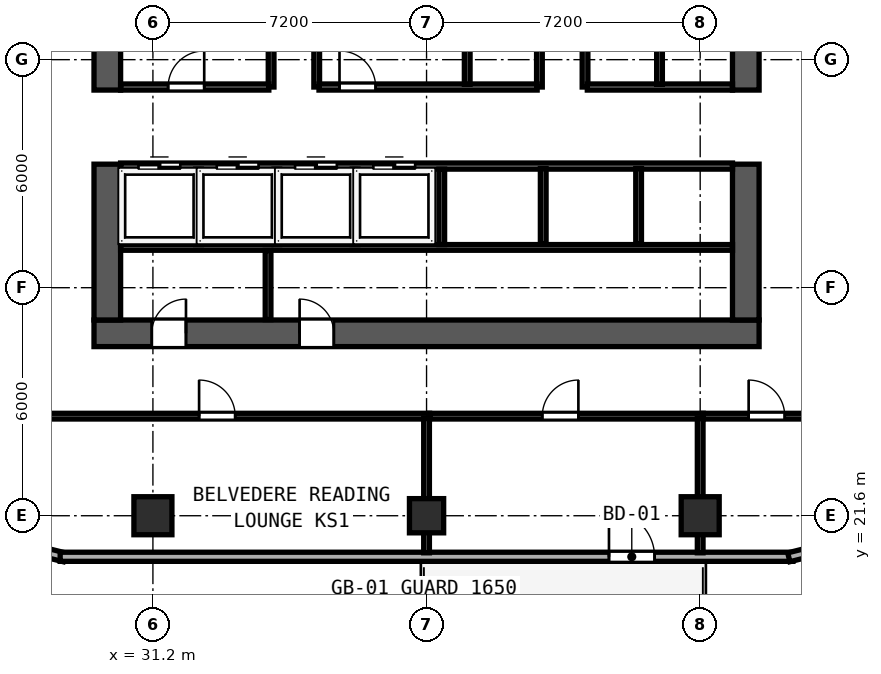
"""IFC4 building model, lengths in metres.
Left out: names, types, materials, properties, quantities, classifications, styles, units other than length and angle.
Written with IfcOpenShell. Run it as: python <this file> out.ifc"""

import sys

from ifc_helpers import new_model, si_unit, direction, frame, frame_2d, origin, origin_2d, place, context, subcontext, project, spatial, rectangle, hollow_rectangle, extrude, element, fill, save


model = new_model("IFC4")
c1 = context("Model", 3, precision=1e-05, world=origin(), true_north=direction((0.0, 1.0)))
c2 = subcontext(c1, "Body", "Model", "MODEL_VIEW")
j1 = project(units=[si_unit("LENGTHUNIT", "METRE"), si_unit("PLANEANGLEUNIT", "RADIAN")], contexts=[c1])
p1 = place(None, origin())
s1 = spatial("IfcSite", under=j1, at=p1, CompositionType="ELEMENT")
p2 = place(p1, origin())
s2 = spatial("IfcBuilding", under=s1, at=p2, CompositionType="ELEMENT")
p3 = place(p2, frame((0.0, 0.0, 128.8)))
s3 = spatial("IfcBuildingStorey", under=s2, at=p3, CompositionType="ELEMENT", Elevation=128.8)
p4 = place(p3, frame((29.65, 26.4, 0.0), z_axis=(0.0, 0.0, 1.0), x_axis=(1.0, 0.0, 0.0)))
e1 = element("IfcWall", 1, at=p4, inside=s3, PredefinedType="SHEAR", context=c2, shape_type="SweptSolid", body=[
    extrude(rectangle(XDim=17.5, YDim=0.7, at=frame_2d((8.75, 0.0))), origin(), (0.0, 0.0, 1.0), 3.6),
])
p5 = place(p4, frame((2.42, 0.0, 0.0), z_axis=(0.0, 0.0, 1.0), x_axis=(-1.0, 0.0, 0.0)))
e2 = element("IfcOpeningElement", 2, at=p5, cuts=e1, PredefinedType="OPENING", context=c2, shape_type="SweptSolid", body=[
    extrude(rectangle(XDim=0.9, YDim=2.1, at=frame_2d((0.45, 1.05))), frame((0.0, 0.36, 0.0), z_axis=(0.0, -1.0, 0.0), x_axis=(1.0, 0.0, 0.0)), (0.0, 0.0, 1.0), 0.72),
])
p6 = place(p4, frame((6.31, 0.0, 0.0), z_axis=(0.0, 0.0, 1.0), x_axis=(-1.0, 0.0, 0.0)))
e3 = element("IfcOpeningElement", 3, at=p6, cuts=e1, PredefinedType="OPENING", context=c2, shape_type="SweptSolid", body=[
    extrude(rectangle(XDim=0.9, YDim=2.1, at=frame_2d((0.45, 1.05))), frame((0.0, 0.36, 0.0), z_axis=(0.0, -1.0, 0.0), x_axis=(1.0, 0.0, 0.0)), (0.0, 0.0, 1.0), 0.72),
])
p7 = place(p3, frame((30.0, 26.75, 0.0), z_axis=(0.0, 0.0, 1.0), x_axis=(0.0, 1.0, 0.0)))
e4 = element("IfcWall", 4, at=p7, inside=s3, PredefinedType="SHEAR", context=c2, shape_type="SweptSolid", body=[
    extrude(rectangle(XDim=4.1, YDim=0.7, at=frame_2d((2.05, 0.0))), origin(), (0.0, 0.0, 1.0), 3.6),
])
p8 = place(p3, frame((30.0, 32.8, 0.0), z_axis=(0.0, 0.0, 1.0), x_axis=(0.0, 1.0, 0.0)))
e5 = element("IfcWall", 5, at=p8, inside=s3, PredefinedType="SHEAR", context=c2, shape_type="SweptSolid", body=[
    extrude(rectangle(XDim=10.05, YDim=0.7, at=frame_2d((5.025, 0.0))), origin(), (0.0, 0.0, 1.0), 3.6),
])
p9 = place(p3, frame((46.8, 26.75, 0.0), z_axis=(0.0, 0.0, 1.0), x_axis=(0.0, 1.0, 0.0)))
e6 = element("IfcWall", 6, at=p9, inside=s3, PredefinedType="SHEAR", context=c2, shape_type="SweptSolid", body=[
    extrude(rectangle(XDim=4.1, YDim=0.7, at=frame_2d((2.05, 0.0))), origin(), (0.0, 0.0, 1.0), 3.6),
])
p10 = place(p3, frame((46.8, 32.8, 0.0), z_axis=(0.0, 0.0, 1.0), x_axis=(0.0, 1.0, 0.0)))
e7 = element("IfcWall", 7, at=p10, inside=s3, PredefinedType="SHEAR", context=c2, shape_type="SweptSolid", body=[
    extrude(rectangle(XDim=10.05, YDim=0.7, at=frame_2d((5.025, 0.0))), origin(), (0.0, 0.0, 1.0), 3.6),
])
for number, where, z_axis, x_axis in (
    (8, (31.2, 21.6, 0.0), (0.0, 0.0, 1.0), (1.0, 0.0, 0.0)),
    (9, (45.6, 21.6, 0.0), (0.0, 0.0, 1.0), (1.0, 0.0, 0.0)),
):
    element("IfcColumn", number, at=place(p3, frame(where, z_axis=z_axis, x_axis=x_axis)), inside=s3, PredefinedType="COLUMN", context=c2, shape_type="SweptSolid", body=[
        extrude(hollow_rectangle(XDim=1.0, YDim=1.0, WallThickness=0.038, at=origin_2d()), origin(), (0.0, 0.0, 1.0), 3.8),
    ])
p11 = place(p3, frame((38.4, 21.6, 0.0), z_axis=(0.0, 0.0, 1.0), x_axis=(1.0, 0.0, 0.0)))
e10 = element("IfcColumn", 10, at=p11, inside=s3, PredefinedType="COLUMN", context=c2, shape_type="SweptSolid", body=[
    extrude(hollow_rectangle(XDim=0.9, YDim=0.9, WallThickness=0.034, at=origin_2d()), origin(), (0.0, 0.0, 1.0), 3.8),
])
p12 = place(p3, frame((24.492, 21.601, 0.0), z_axis=(0.0, 0.0, 1.0), x_axis=(0.970145683738, -0.242522890311, 0.0)))
e11 = element("IfcWall", 11, at=p12, inside=s3, PredefinedType="SOLIDWALL", context=c2, shape_type="SweptSolid", body=[
    extrude(rectangle(XDim=4.511, YDim=0.24, at=frame_2d((2.255, 0.0))), origin(), (0.0, 0.0, 1.0), 3.145),
])
p13 = place(p12, frame((0.7, 0.0, 0.85)))
e12 = element("IfcOpeningElement", 12, at=p13, cuts=e11, PredefinedType="OPENING", context=c2, shape_type="SweptSolid", body=[
    extrude(rectangle(XDim=1.15, YDim=1.8, at=frame_2d((0.575, 0.9))), frame((0.0, 0.13, 0.0), z_axis=(0.0, -1.0, 0.0), x_axis=(1.0, 0.0, 0.0)), (0.0, 0.0, 1.0), 0.26),
])
p14 = place(p3, frame((28.76, 20.52, 0.0), z_axis=(0.0, 0.0, 1.0), x_axis=(1.0, 0.0, 0.0)))
e13 = element("IfcWall", 13, at=p14, inside=s3, PredefinedType="SOLIDWALL", context=c2, shape_type="SweptSolid", body=[
    extrude(rectangle(XDim=19.281, YDim=0.24, at=frame_2d((9.64, 0.0))), origin(), (0.0, 0.0, 1.0), 3.6),
])
p15 = place(p14, frame((15.64, 0.0, 0.0), z_axis=(0.0, 0.0, 1.0), x_axis=(-1.0, 0.0, 0.0)))
e14 = element("IfcOpeningElement", 14, at=p15, cuts=e13, PredefinedType="OPENING", context=c2, shape_type="SweptSolid", body=[
    extrude(rectangle(XDim=1.2, YDim=2.15, at=frame_2d((0.6, 1.075))), frame((0.0, 0.13, 0.0), z_axis=(0.0, -1.0, 0.0), x_axis=(1.0, 0.0, 0.0)), (0.0, 0.0, 1.0), 0.26),
])
p16 = place(p3, frame((47.932, 20.507, 0.0), z_axis=(0.0, 0.0, 1.0), x_axis=(0.970145683738, 0.242522890311, 0.0)))
e15 = element("IfcWall", 15, at=p16, inside=s3, PredefinedType="SOLIDWALL", context=c2, shape_type="SweptSolid", body=[
    extrude(rectangle(XDim=4.511, YDim=0.24, at=frame_2d((2.255, 0.0))), origin(), (0.0, 0.0, 1.0), 3.145),
])
p17 = place(p16, frame((0.7, 0.0, 0.85)))
e16 = element("IfcOpeningElement", 16, at=p17, cuts=e15, PredefinedType="OPENING", context=c2, shape_type="SweptSolid", body=[
    extrude(rectangle(XDim=1.15, YDim=1.8, at=frame_2d((0.575, 0.9))), frame((0.0, 0.13, 0.0), z_axis=(0.0, -1.0, 0.0), x_axis=(1.0, 0.0, 0.0)), (0.0, 0.0, 1.0), 0.26),
])
for number, where, z_axis, x_axis in (
    (17, (34.31, 32.88, 0.0), (0.0, 0.0, 1.0), (0.0, 1.0, 0.0)),
    (18, (35.51, 32.88, 0.0), (0.0, 0.0, 1.0), (0.0, 1.0, 0.0)),
    (19, (41.37, 32.88, 0.0), (0.0, 0.0, 1.0), (0.0, 1.0, 0.0)),
    (20, (42.57, 32.88, 0.0), (0.0, 0.0, 1.0), (0.0, 1.0, 0.0)),
):
    element("IfcWall", number, at=place(p3, frame(where, z_axis=z_axis, x_axis=x_axis)), inside=s3, PredefinedType="SOLIDWALL", context=c2, shape_type="SweptSolid", body=[
        extrude(rectangle(XDim=2.17, YDim=0.15, at=frame_2d((1.085, 0.0))), origin(), (0.0, 0.0, 1.0), 3.6),
    ])
p18 = place(p3, frame((30.35, 32.88, 0.0), z_axis=(0.0, 0.0, 1.0), x_axis=(1.0, 0.0, 0.0)))
e21 = element("IfcWall", 21, at=p18, inside=s3, PredefinedType="SOLIDWALL", context=c2, shape_type="SweptSolid", body=[
    extrude(rectangle(XDim=3.9, YDim=0.16, at=frame_2d((1.95, 0.0))), origin(), (0.0, 0.0, 1.0), 3.6),
])
p19 = place(p18, frame((2.2, 0.0, 0.0), z_axis=(0.0, 0.0, 1.0), x_axis=(-1.0, 0.0, 0.0)))
e22 = element("IfcOpeningElement", 22, at=p19, cuts=e21, PredefinedType="OPENING", context=c2, shape_type="SweptSolid", body=[
    extrude(rectangle(XDim=0.95, YDim=2.12, at=frame_2d((0.475, 1.06))), frame((0.0, 0.09, 0.0), z_axis=(0.0, -1.0, 0.0), x_axis=(1.0, 0.0, 0.0)), (0.0, 0.0, 1.0), 0.18),
])
p20 = place(p3, frame((35.57, 32.88, 0.0), z_axis=(0.0, 0.0, 1.0), x_axis=(1.0, 0.0, 0.0)))
e23 = element("IfcWall", 23, at=p20, inside=s3, PredefinedType="SOLIDWALL", context=c2, shape_type="SweptSolid", body=[
    extrude(rectangle(XDim=5.74, YDim=0.16, at=frame_2d((2.87, 0.0))), origin(), (0.0, 0.0, 1.0), 3.6),
])
p21 = place(p20, frame((1.49, 0.0, 0.0), z_axis=(0.0, 0.0, 1.0), x_axis=(-1.0, 0.0, 0.0)))
e24 = element("IfcOpeningElement", 24, at=p21, cuts=e23, PredefinedType="OPENING", context=c2, shape_type="SweptSolid", body=[
    extrude(rectangle(XDim=0.95, YDim=2.12, at=frame_2d((0.475, 1.06))), frame((0.0, 0.09, 0.0), z_axis=(0.0, -1.0, 0.0), x_axis=(1.0, 0.0, 0.0)), (0.0, 0.0, 1.0), 0.18),
])
p22 = place(p3, frame((42.63, 32.88, 0.0), z_axis=(0.0, 0.0, 1.0), x_axis=(1.0, 0.0, 0.0)))
e25 = element("IfcWall", 25, at=p22, inside=s3, PredefinedType="SOLIDWALL", context=c2, shape_type="SweptSolid", body=[
    extrude(rectangle(XDim=3.82, YDim=0.16, at=frame_2d((1.91, 0.0))), origin(), (0.0, 0.0, 1.0), 3.6),
])
for number, where, z_axis, x_axis in (
    (26, (39.47, 32.95, 0.0), (0.0, 0.0, 1.0), (0.0, 1.0, 0.0)),
    (27, (44.53, 32.95, 0.0), (0.0, 0.0, 1.0), (0.0, 1.0, 0.0)),
):
    element("IfcWall", number, at=place(p3, frame(where, z_axis=z_axis, x_axis=x_axis)), inside=s3, PredefinedType="SOLIDWALL", context=c2, shape_type="SweptSolid", body=[
        extrude(rectangle(XDim=2.05, YDim=0.15, at=frame_2d((1.025, 0.0))), origin(), (0.0, 0.0, 1.0), 3.6),
    ])
p23 = place(p3, frame((30.35, 30.8, 0.0), z_axis=(0.0, 0.0, 1.0), x_axis=(1.0, 0.0, 0.0)))
e28 = element("IfcWall", 28, at=p23, inside=s3, PredefinedType="SOLIDWALL", context=c2, shape_type="SweptSolid", body=[
    extrude(rectangle(XDim=16.1, YDim=0.16, at=frame_2d((8.05, 0.0))), origin(), (0.0, 0.0, 1.0), 3.6),
])
p24 = place(p23, frame((0.47, 0.0, 0.0)))
e29 = element("IfcOpeningElement", 29, at=p24, cuts=e28, PredefinedType="OPENING", context=c2, shape_type="SweptSolid", body=[
    extrude(rectangle(XDim=1.1, YDim=2.2, at=frame_2d((0.55, 1.1))), frame((0.0, 0.09, 0.0), z_axis=(0.0, -1.0, 0.0), x_axis=(1.0, 0.0, 0.0)), (0.0, 0.0, 1.0), 0.18),
])
p25 = place(p23, frame((2.53, 0.0, 0.0)))
e30 = element("IfcOpeningElement", 30, at=p25, cuts=e28, PredefinedType="OPENING", context=c2, shape_type="SweptSolid", body=[
    extrude(rectangle(XDim=1.1, YDim=2.2, at=frame_2d((0.55, 1.1))), frame((0.0, 0.09, 0.0), z_axis=(0.0, -1.0, 0.0), x_axis=(1.0, 0.0, 0.0)), (0.0, 0.0, 1.0), 0.18),
])
p26 = place(p23, frame((4.59, 0.0, 0.0)))
e31 = element("IfcOpeningElement", 31, at=p26, cuts=e28, PredefinedType="OPENING", context=c2, shape_type="SweptSolid", body=[
    extrude(rectangle(XDim=1.1, YDim=2.2, at=frame_2d((0.55, 1.1))), frame((0.0, 0.09, 0.0), z_axis=(0.0, -1.0, 0.0), x_axis=(1.0, 0.0, 0.0)), (0.0, 0.0, 1.0), 0.18),
])
p27 = place(p23, frame((6.65, 0.0, 0.0)))
e32 = element("IfcOpeningElement", 32, at=p27, cuts=e28, PredefinedType="OPENING", context=c2, shape_type="SweptSolid", body=[
    extrude(rectangle(XDim=1.1, YDim=2.2, at=frame_2d((0.55, 1.1))), frame((0.0, 0.09, 0.0), z_axis=(0.0, -1.0, 0.0), x_axis=(1.0, 0.0, 0.0)), (0.0, 0.0, 1.0), 0.18),
])
p28 = place(p3, frame((30.35, 28.66, 0.0), z_axis=(0.0, 0.0, 1.0), x_axis=(1.0, 0.0, 0.0)))
e33 = element("IfcWall", 33, at=p28, inside=s3, PredefinedType="PARTITIONING", context=c2, shape_type="SweptSolid", body=[
    extrude(rectangle(XDim=16.1, YDim=0.15, at=frame_2d((8.05, 0.0))), origin(), (0.0, 0.0, 1.0), 3.6),
])
for number, where, z_axis, x_axis in (
    (34, (32.4, 28.735, 0.0), (0.0, 0.0, 1.0), (0.0, 1.0, 0.0)),
    (35, (34.46, 28.735, 0.0), (0.0, 0.0, 1.0), (0.0, 1.0, 0.0)),
    (36, (36.52, 28.735, 0.0), (0.0, 0.0, 1.0), (0.0, 1.0, 0.0)),
    (37, (38.8, 28.735, 0.0), (0.0, 0.0, 1.0), (0.0, 1.0, 0.0)),
):
    element("IfcWall", number, at=place(p3, frame(where, z_axis=z_axis, x_axis=x_axis)), inside=s3, PredefinedType="SOLIDWALL", context=c2, shape_type="SweptSolid", body=[
        extrude(rectangle(XDim=1.985, YDim=0.15, at=frame_2d((0.992, 0.0))), origin(), (0.0, 0.0, 1.0), 3.6),
    ])
p29 = place(p3, frame((34.23, 26.76, 0.0), z_axis=(0.0, 0.0, 1.0), x_axis=(0.0, 1.0, 0.0)))
e38 = element("IfcWall", 38, at=p29, inside=s3, PredefinedType="PARTITIONING", context=c2, shape_type="SweptSolid", body=[
    extrude(rectangle(XDim=1.82, YDim=0.15, at=frame_2d((0.91, 0.0))), origin(), (0.0, 0.0, 1.0), 3.6),
])
for number, where, z_axis, x_axis in (
    (39, (41.47, 28.75, 0.0), (0.0, 0.0, 1.0), (0.0, 1.0, 0.0)),
    (40, (43.98, 28.75, 0.0), (0.0, 0.0, 1.0), (0.0, 1.0, 0.0)),
):
    element("IfcWall", number, at=place(p3, frame(where, z_axis=z_axis, x_axis=x_axis)), inside=s3, PredefinedType="SOLIDWALL", context=c2, shape_type="SweptSolid", body=[
        extrude(rectangle(XDim=1.985, YDim=0.15, at=frame_2d((0.993, 0.0))), origin(), (0.0, 0.0, 1.0), 3.6),
    ])
p30 = place(p3, frame((23.92, 24.22, 0.0), z_axis=(0.0, 0.0, 1.0), x_axis=(1.0, 0.0, 0.0)))
e41 = element("IfcWall", 41, at=p30, inside=s3, PredefinedType="PARTITIONING", context=c2, shape_type="SweptSolid", body=[
    extrude(rectangle(XDim=14.56, YDim=0.15, at=frame_2d((7.28, 0.0))), origin(), (0.0, 0.0, 1.0), 3.6),
])
p31 = place(p30, frame((9.445, 0.0, 0.0), z_axis=(0.0, 0.0, 1.0), x_axis=(-1.0, 0.0, 0.0)))
e42 = element("IfcOpeningElement", 42, at=p31, cuts=e41, PredefinedType="OPENING", context=c2, shape_type="SweptSolid", body=[
    extrude(rectangle(XDim=0.95, YDim=2.12, at=frame_2d((0.475, 1.06))), frame((0.0, 0.085, 0.0), z_axis=(0.0, -1.0, 0.0), x_axis=(1.0, 0.0, 0.0)), (0.0, 0.0, 1.0), 0.17),
])
p32 = place(p3, frame((38.4, 20.625, 0.0), z_axis=(0.0, 0.0, 1.0), x_axis=(0.0, 1.0, 0.0)))
e43 = element("IfcWall", 43, at=p32, inside=s3, PredefinedType="PARTITIONING", context=c2, shape_type="SweptSolid", body=[
    extrude(rectangle(XDim=3.535, YDim=0.15, at=frame_2d((1.768, 0.0))), origin(), (0.0, 0.0, 1.0), 3.085),
])
p33 = place(p3, frame((38.482, 24.22, 0.0), z_axis=(0.0, 0.0, 1.0), x_axis=(1.0, 0.0, 0.0)))
e44 = element("IfcWall", 44, at=p33, inside=s3, PredefinedType="PARTITIONING", context=c2, shape_type="SweptSolid", body=[
    extrude(rectangle(XDim=7.198, YDim=0.15, at=frame_2d((3.599, 0.0))), origin(), (0.0, 0.0, 1.0), 3.6),
])
p34 = place(p33, frame((3.913, 0.0, 0.0), z_axis=(0.0, 0.0, 1.0), x_axis=(-1.0, 0.0, 0.0)))
e45 = element("IfcOpeningElement", 45, at=p34, cuts=e44, PredefinedType="OPENING", context=c2, shape_type="SweptSolid", body=[
    extrude(rectangle(XDim=0.95, YDim=2.12, at=frame_2d((0.475, 1.06))), frame((0.0, 0.085, 0.0), z_axis=(0.0, -1.0, 0.0), x_axis=(1.0, 0.0, 0.0)), (0.0, 0.0, 1.0), 0.17),
])
p35 = place(p3, frame((45.6, 20.625, 0.0), z_axis=(0.0, 0.0, 1.0), x_axis=(0.0, 1.0, 0.0)))
e46 = element("IfcWall", 46, at=p35, inside=s3, PredefinedType="PARTITIONING", context=c2, shape_type="SweptSolid", body=[
    extrude(rectangle(XDim=3.535, YDim=0.15, at=frame_2d((1.768, 0.0))), origin(), (0.0, 0.0, 1.0), 3.085),
])
p36 = place(p3, frame((45.682, 24.22, 0.0), z_axis=(0.0, 0.0, 1.0), x_axis=(1.0, 0.0, 0.0)))
e47 = element("IfcWall", 47, at=p36, inside=s3, PredefinedType="PARTITIONING", context=c2, shape_type="SweptSolid", body=[
    extrude(rectangle(XDim=7.198, YDim=0.15, at=frame_2d((3.599, 0.0))), origin(), (0.0, 0.0, 1.0), 3.6),
])
p37 = place(p36, frame((2.143, 0.0, 0.0), z_axis=(0.0, 0.0, 1.0), x_axis=(-1.0, 0.0, 0.0)))
e48 = element("IfcOpeningElement", 48, at=p37, cuts=e47, PredefinedType="OPENING", context=c2, shape_type="SweptSolid", body=[
    extrude(rectangle(XDim=0.95, YDim=2.12, at=frame_2d((0.475, 1.06))), frame((0.0, 0.085, 0.0), z_axis=(0.0, -1.0, 0.0), x_axis=(1.0, 0.0, 0.0)), (0.0, 0.0, 1.0), 0.17),
])
p38 = place(p15, origin())
e49 = element("IfcDoor", 49, at=p38, inside=s3, OperationType="SINGLE_SWING_RIGHT", PredefinedType="DOOR", context=c2, shape_type="SweptSolid", body=[
    extrude(rectangle(XDim=1.2, YDim=2.15, at=frame_2d((0.6, 1.075))), frame((0.0, 0.025, 0.0), z_axis=(0.0, -1.0, 0.0), x_axis=(1.0, 0.0, 0.0)), (0.0, 0.0, 1.0), 0.05),
])
fill(e14, e49)
p39 = place(p19, origin())
e50 = element("IfcDoor", 50, at=p39, inside=s3, OperationType="SINGLE_SWING_LEFT", PredefinedType="DOOR", context=c2, shape_type="SweptSolid", body=[
    extrude(rectangle(XDim=0.95, YDim=2.12, at=frame_2d((0.475, 1.06))), frame((0.0, 0.025, 0.0), z_axis=(0.0, -1.0, 0.0), x_axis=(1.0, 0.0, 0.0)), (0.0, 0.0, 1.0), 0.05),
])
fill(e22, e50)
p40 = place(p21, origin())
e51 = element("IfcDoor", 51, at=p40, inside=s3, OperationType="SINGLE_SWING_RIGHT", PredefinedType="DOOR", context=c2, shape_type="SweptSolid", body=[
    extrude(rectangle(XDim=0.95, YDim=2.12, at=frame_2d((0.475, 1.06))), frame((0.0, 0.025, 0.0), z_axis=(0.0, -1.0, 0.0), x_axis=(1.0, 0.0, 0.0)), (0.0, 0.0, 1.0), 0.05),
])
fill(e24, e51)
p41 = place(p24, origin())
e52 = element("IfcDoor", 52, at=p41, inside=s3, OperationType="SLIDING_TO_LEFT", PredefinedType="DOOR", context=c2, shape_type="SweptSolid", body=[
    extrude(rectangle(XDim=1.1, YDim=2.2, at=frame_2d((0.55, 1.1))), frame((0.0, 0.025, 0.0), z_axis=(0.0, -1.0, 0.0), x_axis=(1.0, 0.0, 0.0)), (0.0, 0.0, 1.0), 0.05),
])
fill(e29, e52)
p42 = place(p25, origin())
e53 = element("IfcDoor", 53, at=p42, inside=s3, OperationType="SLIDING_TO_LEFT", PredefinedType="DOOR", context=c2, shape_type="SweptSolid", body=[
    extrude(rectangle(XDim=1.1, YDim=2.2, at=frame_2d((0.55, 1.1))), frame((0.0, 0.025, 0.0), z_axis=(0.0, -1.0, 0.0), x_axis=(1.0, 0.0, 0.0)), (0.0, 0.0, 1.0), 0.05),
])
fill(e30, e53)
p43 = place(p26, origin())
e54 = element("IfcDoor", 54, at=p43, inside=s3, OperationType="SLIDING_TO_LEFT", PredefinedType="DOOR", context=c2, shape_type="SweptSolid", body=[
    extrude(rectangle(XDim=1.1, YDim=2.2, at=frame_2d((0.55, 1.1))), frame((0.0, 0.025, 0.0), z_axis=(0.0, -1.0, 0.0), x_axis=(1.0, 0.0, 0.0)), (0.0, 0.0, 1.0), 0.05),
])
fill(e31, e54)
p44 = place(p27, origin())
e55 = element("IfcDoor", 55, at=p44, inside=s3, OperationType="SLIDING_TO_LEFT", PredefinedType="DOOR", context=c2, shape_type="SweptSolid", body=[
    extrude(rectangle(XDim=1.1, YDim=2.2, at=frame_2d((0.55, 1.1))), frame((0.0, 0.025, 0.0), z_axis=(0.0, -1.0, 0.0), x_axis=(1.0, 0.0, 0.0)), (0.0, 0.0, 1.0), 0.05),
])
fill(e32, e55)
p45 = place(p5, origin())
e56 = element("IfcDoor", 56, at=p45, inside=s3, OperationType="SINGLE_SWING_LEFT", PredefinedType="DOOR", context=c2, shape_type="SweptSolid", body=[
    extrude(rectangle(XDim=0.9, YDim=2.1, at=frame_2d((0.45, 1.05))), frame((0.0, -0.195, 0.0), z_axis=(0.0, -1.0, 0.0), x_axis=(1.0, 0.0, 0.0)), (0.0, 0.0, 1.0), 0.05),
])
fill(e2, e56)
p46 = place(p6, origin())
e57 = element("IfcDoor", 57, at=p46, inside=s3, OperationType="SINGLE_SWING_RIGHT", PredefinedType="DOOR", context=c2, shape_type="SweptSolid", body=[
    extrude(rectangle(XDim=0.9, YDim=2.1, at=frame_2d((0.45, 1.05))), frame((0.0, -0.195, 0.0), z_axis=(0.0, -1.0, 0.0), x_axis=(1.0, 0.0, 0.0)), (0.0, 0.0, 1.0), 0.05),
])
fill(e3, e57)
p47 = place(p31, origin())
e58 = element("IfcDoor", 58, at=p47, inside=s3, OperationType="SINGLE_SWING_RIGHT", PredefinedType="DOOR", context=c2, shape_type="SweptSolid", body=[
    extrude(rectangle(XDim=0.95, YDim=2.12, at=frame_2d((0.475, 1.06))), frame((0.0, 0.025, 0.0), z_axis=(0.0, -1.0, 0.0), x_axis=(1.0, 0.0, 0.0)), (0.0, 0.0, 1.0), 0.05),
])
fill(e42, e58)
p48 = place(p34, origin())
e59 = element("IfcDoor", 59, at=p48, inside=s3, OperationType="SINGLE_SWING_LEFT", PredefinedType="DOOR", context=c2, shape_type="SweptSolid", body=[
    extrude(rectangle(XDim=0.95, YDim=2.12, at=frame_2d((0.475, 1.06))), frame((0.0, 0.025, 0.0), z_axis=(0.0, -1.0, 0.0), x_axis=(1.0, 0.0, 0.0)), (0.0, 0.0, 1.0), 0.05),
])
fill(e45, e59)
p49 = place(p37, origin())
e60 = element("IfcDoor", 60, at=p49, inside=s3, OperationType="SINGLE_SWING_RIGHT", PredefinedType="DOOR", context=c2, shape_type="SweptSolid", body=[
    extrude(rectangle(XDim=0.95, YDim=2.12, at=frame_2d((0.475, 1.06))), frame((0.0, 0.025, 0.0), z_axis=(0.0, -1.0, 0.0), x_axis=(1.0, 0.0, 0.0)), (0.0, 0.0, 1.0), 0.05),
])
fill(e48, e60)
save(model, sys.argv[1])
